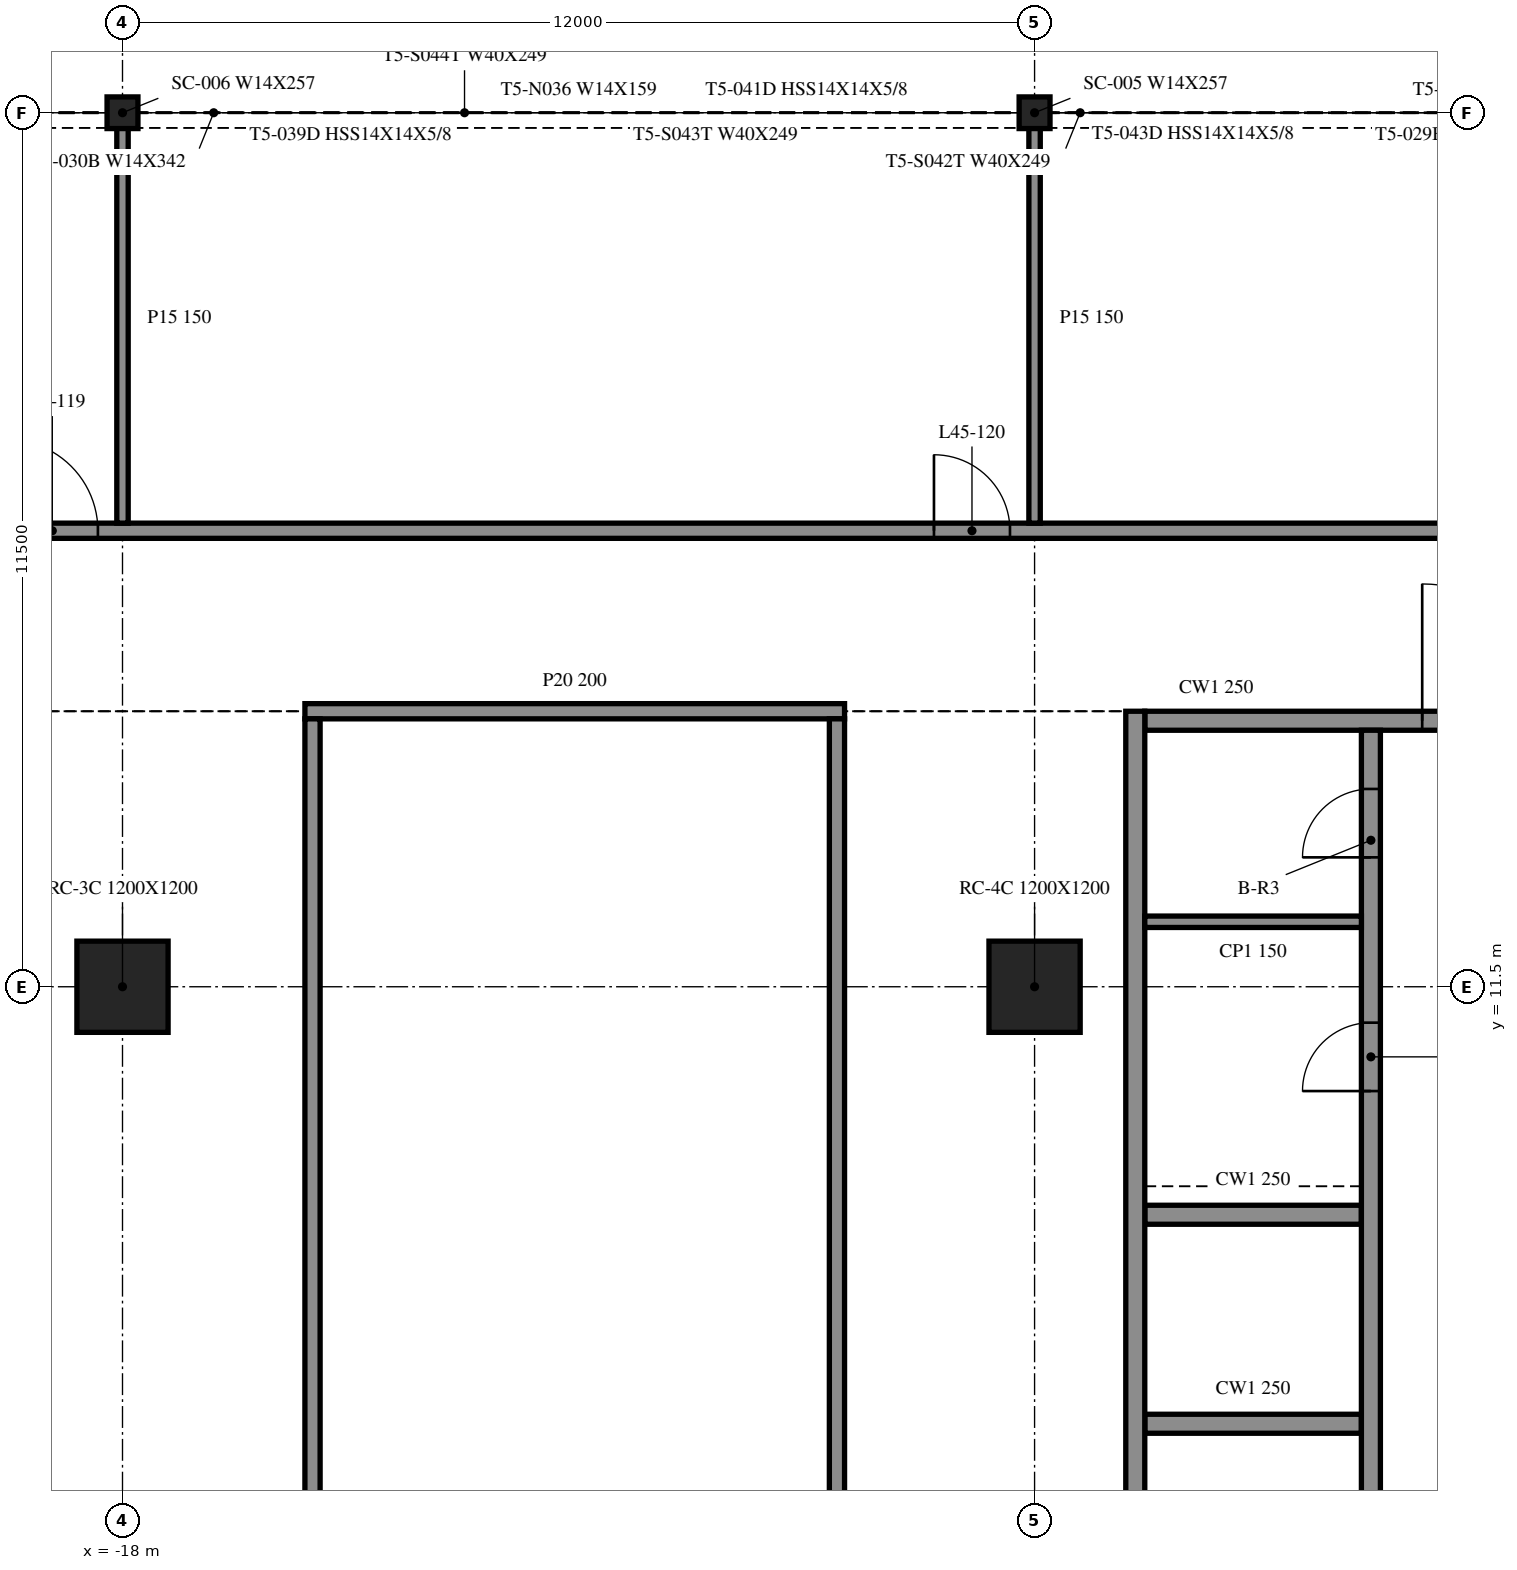
"""IFC4 building model, lengths in metres.
Left out: names, types, materials, properties, quantities, classifications, styles, units other than length and angle.
Written with IfcOpenShell. Run it as: python <this file> out.ifc"""

import sys

from ifc_helpers import new_model, si_unit, direction, frame, frame_2d, origin, origin_2d, place, context, subcontext, project, spatial, rectangle, i_section, extrude, element, fill, save


model = new_model("IFC4")
c1 = context("Model", 3, precision=1e-05, world=origin(), true_north=direction((0.0, 1.0)))
c2 = subcontext(c1, "Body", "Model", "MODEL_VIEW")
j1 = project(units=[si_unit("LENGTHUNIT", "METRE"), si_unit("PLANEANGLEUNIT", "RADIAN")], contexts=[c1])
p1 = place(None, origin())
s1 = spatial("IfcSite", under=j1, at=p1, CompositionType="ELEMENT")
p2 = place(p1, origin())
s2 = spatial("IfcBuilding", under=s1, at=p2, CompositionType="ELEMENT")
p3 = place(p2, frame((0.0, 0.0, 189.6)))
s3 = spatial("IfcBuildingStorey", under=s2, at=p3, CompositionType="ELEMENT", Elevation=189.6)
for number, where, z_axis, x_axis in (
    (1, (-18.0, 11.5, -0.4), (0.0, 0.0, 1.0), (1.0, 0.0, 0.0)),
    (2, (-6.0, 11.5, -0.4), (0.0, 0.0, 1.0), (1.0, 0.0, 0.0)),
):
    element("IfcColumn", number, at=place(p3, frame(where, z_axis=z_axis, x_axis=x_axis)), inside=s3, PredefinedType="COLUMN", context=c2, shape_type="SweptSolid", body=[
        extrude(rectangle(XDim=1.2, YDim=1.2, at=origin_2d()), origin(), (0.0, 0.0, 1.0), 4.36),
    ])
for number, where, z_axis, x_axis in (
    (3, (-6.0, 23.0, -0.4), (0.0, 0.0, 1.0), (1.0, 0.0, 0.0)),
    (4, (-18.0, 23.0, -0.4), (0.0, 0.0, 1.0), (1.0, 0.0, 0.0)),
):
    element("IfcColumn", number, at=place(p3, frame(where, z_axis=z_axis, x_axis=x_axis)), inside=s3, PredefinedType="COLUMN", context=c2, shape_type="SweptSolid", body=[
        extrude(i_section(OverallWidth=0.406, OverallDepth=0.417, WebThickness=0.03, FlangeThickness=0.048, at=origin_2d()), origin(), (0.0, 0.0, 1.0), 4.36),
    ])
p4 = place(p3, frame((-4.675, 15.125, 0.0), z_axis=(0.0, 0.0, 1.0), x_axis=(0.0, -1.0, 0.0)))
e5 = element("IfcWall", 5, at=p4, inside=s3, PredefinedType="SOLIDWALL", context=c2, shape_type="SweptSolid", body=[
    extrude(rectangle(XDim=24.25, YDim=0.25, at=frame_2d((12.125, 0.0))), origin(), (0.0, 0.0, 1.0), 3.96),
])
p5 = place(p3, frame((-4.55, 15.0, 0.0), z_axis=(0.0, 0.0, 1.0), x_axis=(1.0, 0.0, 0.0)))
e6 = element("IfcWall", 6, at=p5, inside=s3, PredefinedType="SOLIDWALL", context=c2, shape_type="SweptSolid", body=[
    extrude(rectangle(XDim=9.1, YDim=0.25, at=frame_2d((4.55, 0.0))), origin(), (0.0, 0.0, 1.0), 3.96),
])
p6 = place(p5, frame((3.65, 0.0, 0.0)))
e7 = element("IfcOpeningElement", 7, at=p6, cuts=e6, PredefinedType="OPENING", context=c2, shape_type="SweptSolid", body=[
    extrude(rectangle(XDim=1.8, YDim=2.1, at=frame_2d((0.9, 1.05))), frame((0.0, 0.135, 0.0), z_axis=(0.0, -1.0, 0.0), x_axis=(1.0, 0.0, 0.0)), (0.0, 0.0, 1.0), 0.27),
])
p7 = place(p3, frame((-1.575, -8.875, 0.0), z_axis=(0.0, 0.0, 1.0), x_axis=(0.0, 1.0, 0.0)))
e8 = element("IfcWall", 8, at=p7, inside=s3, PredefinedType="SOLIDWALL", context=c2, shape_type="SweptSolid", body=[
    extrude(rectangle(XDim=23.75, YDim=0.25, at=frame_2d((11.875, 0.0))), origin(), (0.0, 0.0, 1.0), 3.96),
])
p8 = place(p7, frame((2.55, 0.0, 0.0)))
e9 = element("IfcOpeningElement", 9, at=p8, cuts=e8, PredefinedType="OPENING", context=c2, shape_type="SweptSolid", body=[
    extrude(rectangle(XDim=0.9, YDim=2.1, at=frame_2d((0.45, 1.05))), frame((0.0, 0.135, 0.0), z_axis=(0.0, -1.0, 0.0), x_axis=(1.0, 0.0, 0.0)), (0.0, 0.0, 1.0), 0.27),
])
p9 = place(p7, frame((19.002, 0.0, 0.0)))
e10 = element("IfcOpeningElement", 10, at=p9, cuts=e8, PredefinedType="OPENING", context=c2, shape_type="SweptSolid", body=[
    extrude(rectangle(XDim=0.9, YDim=2.1, at=frame_2d((0.45, 1.05))), frame((0.0, 0.135, 0.0), z_axis=(0.0, -1.0, 0.0), x_axis=(1.0, 0.0, 0.0)), (0.0, 0.0, 1.0), 0.27),
])
p10 = place(p7, frame((22.077, 0.0, 0.0)))
e11 = element("IfcOpeningElement", 11, at=p10, cuts=e8, PredefinedType="OPENING", context=c2, shape_type="SweptSolid", body=[
    extrude(rectangle(XDim=0.9, YDim=2.1, at=frame_2d((0.45, 1.05))), frame((0.0, 0.135, 0.0), z_axis=(0.0, -1.0, 0.0), x_axis=(1.0, 0.0, 0.0)), (0.0, 0.0, 1.0), 0.27),
])
for number, where, z_axis, x_axis in (
    (12, (-4.55, 5.75, 0.0), (0.0, 0.0, 1.0), (1.0, 0.0, 0.0)),
    (13, (-4.55, 8.5, 0.0), (0.0, 0.0, 1.0), (1.0, 0.0, 0.0)),
):
    element("IfcWall", number, at=place(p3, frame(where, z_axis=z_axis, x_axis=x_axis)), inside=s3, PredefinedType="SOLIDWALL", context=c2, shape_type="SweptSolid", body=[
        extrude(rectangle(XDim=2.85, YDim=0.25, at=frame_2d((1.425, 0.0))), origin(), (0.0, 0.0, 1.0), 3.96),
    ])
p11 = place(p3, frame((-4.55, 12.355, 0.0), z_axis=(0.0, 0.0, 1.0), x_axis=(1.0, 0.0, 0.0)))
e14 = element("IfcWall", 14, at=p11, inside=s3, PredefinedType="PARTITIONING", context=c2, shape_type="SweptSolid", body=[
    extrude(rectangle(XDim=2.85, YDim=0.15, at=frame_2d((1.425, 0.0))), origin(), (0.0, 0.0, 1.0), 3.96),
])
p12 = place(p3, frame((-15.6, 15.125, 0.0), z_axis=(0.0, 0.0, 1.0), x_axis=(1.0, 0.0, 0.0)))
e15 = element("IfcWall", 15, at=p12, inside=s3, PredefinedType="PARTITIONING", context=c2, shape_type="SweptSolid", body=[
    extrude(rectangle(XDim=7.1, YDim=0.2, at=frame_2d((3.55, 0.0))), origin(), (0.0, 0.0, 1.0), 3.96),
])
p13 = place(p3, frame((-40.624, 17.5, 0.0), z_axis=(0.0, 0.0, 1.0), x_axis=(1.0, 0.0, 0.0)))
e16 = element("IfcWall", 16, at=p13, inside=s3, PredefinedType="PARTITIONING", context=c2, shape_type="SweptSolid", body=[
    extrude(rectangle(XDim=94.524, YDim=0.2, at=frame_2d((47.262, 0.0))), origin(), (0.0, 0.0, 1.0), 3.96),
])
p14 = place(p13, frame((9.1, 0.0, 0.0)))
e17 = element("IfcOpeningElement", 17, at=p14, cuts=e16, PredefinedType="OPENING", context=c2, shape_type="SweptSolid", body=[
    extrude(rectangle(XDim=1.2, YDim=2.1, at=frame_2d((0.6, 1.05))), frame((0.0, 0.11, 0.0), z_axis=(0.0, -1.0, 0.0), x_axis=(1.0, 0.0, 0.0)), (0.0, 0.0, 1.0), 0.22),
])
p15 = place(p13, frame((21.1, 0.0, 0.0)))
e18 = element("IfcOpeningElement", 18, at=p15, cuts=e16, PredefinedType="OPENING", context=c2, shape_type="SweptSolid", body=[
    extrude(rectangle(XDim=1.2, YDim=2.1, at=frame_2d((0.6, 1.05))), frame((0.0, 0.11, 0.0), z_axis=(0.0, -1.0, 0.0), x_axis=(1.0, 0.0, 0.0)), (0.0, 0.0, 1.0), 0.22),
])
p16 = place(p13, frame((33.3, 0.0, 0.0)))
e19 = element("IfcOpeningElement", 19, at=p16, cuts=e16, PredefinedType="OPENING", context=c2, shape_type="SweptSolid", body=[
    extrude(rectangle(XDim=1.0, YDim=2.1, at=frame_2d((0.5, 1.05))), frame((0.0, 0.11, 0.0), z_axis=(0.0, -1.0, 0.0), x_axis=(1.0, 0.0, 0.0)), (0.0, 0.0, 1.0), 0.22),
])
p17 = place(p13, frame((45.5, 0.0, 0.0)))
e20 = element("IfcOpeningElement", 20, at=p17, cuts=e16, PredefinedType="OPENING", context=c2, shape_type="SweptSolid", body=[
    extrude(rectangle(XDim=0.9, YDim=2.1, at=frame_2d((0.45, 1.05))), frame((0.0, 0.11, 0.0), z_axis=(0.0, -1.0, 0.0), x_axis=(1.0, 0.0, 0.0)), (0.0, 0.0, 1.0), 0.22),
])
p18 = place(p13, frame((46.9, 0.0, 0.0)))
e21 = element("IfcOpeningElement", 21, at=p18, cuts=e16, PredefinedType="OPENING", context=c2, shape_type="SweptSolid", body=[
    extrude(rectangle(XDim=1.0, YDim=2.1, at=frame_2d((0.5, 1.05))), frame((0.0, 0.11, 0.0), z_axis=(0.0, -1.0, 0.0), x_axis=(1.0, 0.0, 0.0)), (0.0, 0.0, 1.0), 0.22),
])
p19 = place(p13, frame((58.9, 0.0, 0.0)))
e22 = element("IfcOpeningElement", 22, at=p19, cuts=e16, PredefinedType="OPENING", context=c2, shape_type="SweptSolid", body=[
    extrude(rectangle(XDim=1.0, YDim=2.1, at=frame_2d((0.5, 1.05))), frame((0.0, 0.11, 0.0), z_axis=(0.0, -1.0, 0.0), x_axis=(1.0, 0.0, 0.0)), (0.0, 0.0, 1.0), 0.22),
])
p20 = place(p13, frame((70.9, 0.0, 0.0)))
e23 = element("IfcOpeningElement", 23, at=p20, cuts=e16, PredefinedType="OPENING", context=c2, shape_type="SweptSolid", body=[
    extrude(rectangle(XDim=1.2, YDim=2.1, at=frame_2d((0.6, 1.05))), frame((0.0, 0.11, 0.0), z_axis=(0.0, -1.0, 0.0), x_axis=(1.0, 0.0, 0.0)), (0.0, 0.0, 1.0), 0.22),
])
p21 = place(p13, frame((82.9, 0.0, 0.0)))
e24 = element("IfcOpeningElement", 24, at=p21, cuts=e16, PredefinedType="OPENING", context=c2, shape_type="SweptSolid", body=[
    extrude(rectangle(XDim=1.2, YDim=2.1, at=frame_2d((0.6, 1.05))), frame((0.0, 0.11, 0.0), z_axis=(0.0, -1.0, 0.0), x_axis=(1.0, 0.0, 0.0)), (0.0, 0.0, 1.0), 0.22),
])
p22 = place(p3, frame((-18.0, 17.6, 0.0), z_axis=(0.0, 0.0, 1.0), x_axis=(0.0, 1.0, 0.0)))
e25 = element("IfcWall", 25, at=p22, inside=s3, PredefinedType="PARTITIONING", context=c2, shape_type="SweptSolid", body=[
    extrude(rectangle(XDim=5.4, YDim=0.15, at=frame_2d((2.7, 0.0))), origin(), (0.0, 0.0, 1.0), 3.96),
])
p23 = place(p3, frame((-15.5, -9.025, 0.0), z_axis=(0.0, 0.0, 1.0), x_axis=(0.0, 1.0, 0.0)))
e26 = element("IfcWall", 26, at=p23, inside=s3, PredefinedType="PARTITIONING", context=c2, shape_type="SweptSolid", body=[
    extrude(rectangle(XDim=24.05, YDim=0.2, at=frame_2d((12.025, 0.0))), origin(), (0.0, 0.0, 1.0), 3.96),
])
p24 = place(p23, frame((11.5, 0.0, 0.0)))
e27 = element("IfcOpeningElement", 27, at=p24, cuts=e26, PredefinedType="OPENING", context=c2, shape_type="SweptSolid", body=[
    extrude(rectangle(XDim=1.0, YDim=2.1, at=frame_2d((0.5, 1.05))), frame((0.0, 0.11, 0.0), z_axis=(0.0, -1.0, 0.0), x_axis=(1.0, 0.0, 0.0)), (0.0, 0.0, 1.0), 0.22),
])
p25 = place(p3, frame((-8.6, -9.025, 0.0), z_axis=(0.0, 0.0, 1.0), x_axis=(0.0, 1.0, 0.0)))
e28 = element("IfcWall", 28, at=p25, inside=s3, PredefinedType="PARTITIONING", context=c2, shape_type="SweptSolid", body=[
    extrude(rectangle(XDim=24.05, YDim=0.2, at=frame_2d((12.025, 0.0))), origin(), (0.0, 0.0, 1.0), 3.96),
])
p26 = place(p3, frame((-6.0, 17.6, 0.0), z_axis=(0.0, 0.0, 1.0), x_axis=(0.0, 1.0, 0.0)))
e29 = element("IfcWall", 29, at=p26, inside=s3, PredefinedType="PARTITIONING", context=c2, shape_type="SweptSolid", body=[
    extrude(rectangle(XDim=5.4, YDim=0.15, at=frame_2d((2.7, 0.0))), origin(), (0.0, 0.0, 1.0), 3.96),
])
p27 = place(p6, origin())
e30 = element("IfcDoor", 30, at=p27, inside=s3, OperationType="DOUBLE_DOOR_SINGLE_SWING", PredefinedType="DOOR", context=c2, shape_type="SweptSolid", body=[
    extrude(rectangle(XDim=1.8, YDim=2.1, at=frame_2d((0.9, 1.05))), frame((0.0, 0.025, 0.0), z_axis=(0.0, -1.0, 0.0), x_axis=(1.0, 0.0, 0.0)), (0.0, 0.0, 1.0), 0.05),
])
fill(e7, e30)
p28 = place(p9, origin())
e31 = element("IfcDoor", 31, at=p28, inside=s3, OperationType="SINGLE_SWING_RIGHT", PredefinedType="DOOR", context=c2, shape_type="SweptSolid", body=[
    extrude(rectangle(XDim=0.9, YDim=2.1, at=frame_2d((0.45, 1.05))), frame((0.0, 0.025, 0.0), z_axis=(0.0, -1.0, 0.0), x_axis=(1.0, 0.0, 0.0)), (0.0, 0.0, 1.0), 0.05),
])
fill(e10, e31)
p29 = place(p10, origin())
e32 = element("IfcDoor", 32, at=p29, inside=s3, OperationType="SINGLE_SWING_LEFT", PredefinedType="DOOR", context=c2, shape_type="SweptSolid", body=[
    extrude(rectangle(XDim=0.9, YDim=2.1, at=frame_2d((0.45, 1.05))), frame((0.0, 0.025, 0.0), z_axis=(0.0, -1.0, 0.0), x_axis=(1.0, 0.0, 0.0)), (0.0, 0.0, 1.0), 0.05),
])
fill(e11, e32)
p30 = place(p15, origin())
e33 = element("IfcDoor", 33, at=p30, inside=s3, OperationType="SINGLE_SWING_LEFT", PredefinedType="DOOR", context=c2, shape_type="SweptSolid", body=[
    extrude(rectangle(XDim=1.2, YDim=2.1, at=frame_2d((0.6, 1.05))), frame((0.0, 0.025, 0.0), z_axis=(0.0, -1.0, 0.0), x_axis=(1.0, 0.0, 0.0)), (0.0, 0.0, 1.0), 0.05),
])
fill(e18, e33)
p31 = place(p16, origin())
e34 = element("IfcDoor", 34, at=p31, inside=s3, OperationType="SINGLE_SWING_LEFT", PredefinedType="DOOR", context=c2, shape_type="SweptSolid", body=[
    extrude(rectangle(XDim=1.0, YDim=2.1, at=frame_2d((0.5, 1.05))), frame((0.0, 0.025, 0.0), z_axis=(0.0, -1.0, 0.0), x_axis=(1.0, 0.0, 0.0)), (0.0, 0.0, 1.0), 0.05),
])
fill(e19, e34)
save(model, sys.argv[1])
